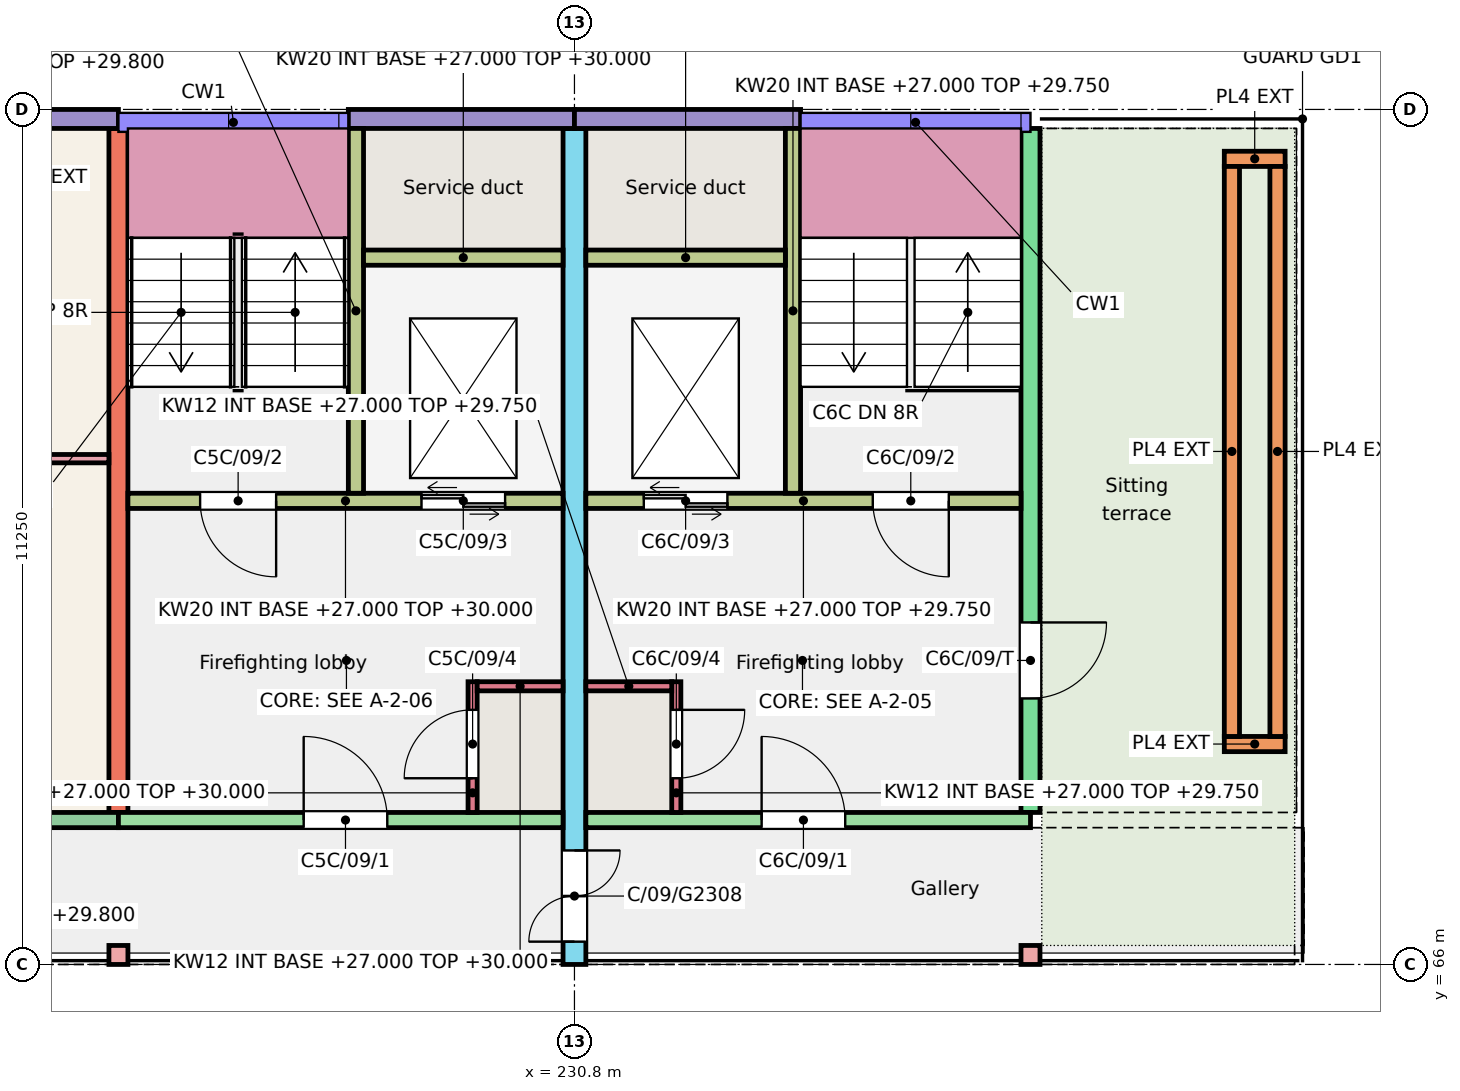
"""IFC4 building model, lengths in metres.
Left out: names, types, materials, properties, quantities, classifications, styles, units other than length and angle.
Written with IfcOpenShell. Run it as: python <this file> out.ifc"""

import sys

from ifc_helpers import new_model, si_unit, direction, frame, frame_2d, origin, origin_2d, place, context, subcontext, project, spatial, rectangle, extrude, element, fill, save


model = new_model("IFC4")
c1 = context("Model", 3, precision=1e-05, world=origin(), true_north=direction((0.0, 1.0)))
c2 = subcontext(c1, "Body", "Model", "MODEL_VIEW")
j1 = project(units=[si_unit("LENGTHUNIT", "METRE"), si_unit("PLANEANGLEUNIT", "RADIAN")], contexts=[c1])
p1 = place(None, origin())
s1 = spatial("IfcSite", under=j1, at=p1, CompositionType="ELEMENT")
p2 = place(p1, origin())
s2 = spatial("IfcBuilding", under=s1, at=p2, CompositionType="ELEMENT")
p3 = place(p2, frame((0.0, 0.0, 27.0)))
s3 = spatial("IfcBuildingStorey", under=s2, at=p3, CompositionType="ELEMENT", Elevation=27.0)
p4 = place(p3, frame((224.8, 68.0, 0.0), z_axis=(0.0, 0.0, 1.0), x_axis=(0.0, 1.0, 0.0)))
e1 = element("IfcWall", 1, at=p4, inside=s3, PredefinedType="SHEAR", context=c2, shape_type="SweptSolid", body=[
    extrude(rectangle(XDim=9.0, YDim=0.25, at=frame_2d((4.5, 0.0))), origin(), (0.0, 0.0, 1.0), 3.0),
])
p5 = place(p3, frame((230.8, 66.0, 0.0), z_axis=(0.0, 0.0, 1.0), x_axis=(0.0, 1.0, 0.0)))
e2 = element("IfcWall", 2, at=p5, inside=s3, PredefinedType="SHEAR", context=c2, shape_type="SweptSolid", body=[
    extrude(rectangle(XDim=11.0, YDim=0.3, at=frame_2d((5.5, 0.0))), origin(), (0.0, 0.0, 1.0), 3.0),
])
p6 = place(p5, frame((0.3, 0.0, 0.0)))
e3 = element("IfcOpeningElement", 3, at=p6, cuts=e2, PredefinedType="OPENING", context=c2, shape_type="SweptSolid", body=[
    extrude(rectangle(XDim=1.2, YDim=2.1, at=frame_2d((0.6, 1.05))), frame((0.0, 0.16, 0.0), z_axis=(0.0, -1.0, 0.0), x_axis=(1.0, 0.0, 0.0)), (0.0, 0.0, 1.0), 0.32),
])
p7 = place(p3, frame((236.8, 68.0, 0.0), z_axis=(0.0, 0.0, 1.0), x_axis=(0.0, 1.0, 0.0)))
e4 = element("IfcWall", 4, at=p7, inside=s3, PredefinedType="SHEAR", context=c2, shape_type="SweptSolid", body=[
    extrude(rectangle(XDim=9.0, YDim=0.25, at=frame_2d((4.5, 0.0))), origin(), (0.0, 0.0, 1.0), 3.0),
])
p8 = place(p7, frame((1.5, 0.0, 0.0)))
e5 = element("IfcOpeningElement", 5, at=p8, cuts=e4, PredefinedType="OPENING", context=c2, shape_type="SweptSolid", body=[
    extrude(rectangle(XDim=1.0, YDim=2.1, at=frame_2d((0.5, 1.05))), frame((0.0, 0.135, 0.0), z_axis=(0.0, -1.0, 0.0), x_axis=(1.0, 0.0, 0.0)), (0.0, 0.0, 1.0), 0.27),
])
p9 = place(p3, frame((221.2, 77.125, 0.0), z_axis=(0.0, 0.0, 1.0), x_axis=(1.0, 0.0, 0.0)))
e6 = element("IfcWall", 6, at=p9, inside=s3, PredefinedType="SOLIDWALL", context=c2, shape_type="SweptSolid", body=[
    extrude(rectangle(XDim=3.6, YDim=0.25, at=frame_2d((1.8, 0.0))), origin(), (0.0, 0.0, 1.0), 3.0),
])
p10 = place(p9, frame((1.038, 0.0, 0.9)))
e7 = element("IfcOpeningElement", 7, at=p10, cuts=e6, PredefinedType="OPENING", context=c2, shape_type="SweptSolid", body=[
    extrude(rectangle(XDim=1.5, YDim=1.5, at=frame_2d((0.75, 0.75))), frame((0.0, 0.135, 0.0), z_axis=(0.0, -1.0, 0.0), x_axis=(1.0, 0.0, 0.0)), (0.0, 0.0, 1.0), 0.27),
])
p11 = place(p3, frame((221.2, 67.9, 0.0), z_axis=(0.0, 0.0, 1.0), x_axis=(1.0, 0.0, 0.0)))
e8 = element("IfcWall", 8, at=p11, inside=s3, PredefinedType="SOLIDWALL", context=c2, shape_type="SweptSolid", body=[
    extrude(rectangle(XDim=3.6, YDim=0.2, at=frame_2d((1.8, 0.0))), origin(), (0.0, 0.0, 1.0), 3.0),
])
p12 = place(p11, frame((1.038, 0.0, 0.9)))
e9 = element("IfcOpeningElement", 9, at=p12, cuts=e8, PredefinedType="OPENING", context=c2, shape_type="SweptSolid", body=[
    extrude(rectangle(XDim=1.5, YDim=1.5, at=frame_2d((0.75, 0.75))), frame((0.0, 0.11, 0.0), z_axis=(0.0, -1.0, 0.0), x_axis=(1.0, 0.0, 0.0)), (0.0, 0.0, 1.0), 0.22),
])
p13 = place(p3, frame((227.825, 77.125, 0.0), z_axis=(0.0, 0.0, 1.0), x_axis=(1.0, 0.0, 0.0)))
e10 = element("IfcWall", 10, at=p13, inside=s3, PredefinedType="SOLIDWALL", context=c2, shape_type="SweptSolid", body=[
    extrude(rectangle(XDim=2.975, YDim=0.25, at=frame_2d((1.488, 0.0))), origin(), (0.0, 0.0, 1.0), 3.0),
])
p14 = place(p3, frame((224.8, 67.9, 0.0), z_axis=(0.0, 0.0, 1.0), x_axis=(1.0, 0.0, 0.0)))
e11 = element("IfcWall", 11, at=p14, inside=s3, PredefinedType="SHEAR", context=c2, shape_type="SweptSolid", body=[
    extrude(rectangle(XDim=5.85, YDim=0.2, at=frame_2d((2.925, 0.0))), origin(), (0.0, 0.0, 1.0), 3.0),
])
p15 = place(p14, frame((2.438, 0.0, 0.0)))
e12 = element("IfcOpeningElement", 12, at=p15, cuts=e11, PredefinedType="OPENING", context=c2, shape_type="SweptSolid", body=[
    extrude(rectangle(XDim=1.1, YDim=2.1, at=frame_2d((0.55, 1.05))), frame((0.0, 0.11, 0.0), z_axis=(0.0, -1.0, 0.0), x_axis=(1.0, 0.0, 0.0)), (0.0, 0.0, 1.0), 0.22),
])
p16 = place(p3, frame((224.925, 72.1, 0.0), z_axis=(0.0, 0.0, 1.0), x_axis=(1.0, 0.0, 0.0)))
e13 = element("IfcWall", 13, at=p16, inside=s3, PredefinedType="SHEAR", context=c2, shape_type="SweptSolid", body=[
    extrude(rectangle(XDim=5.725, YDim=0.2, at=frame_2d((2.862, 0.0))), origin(), (0.0, 0.0, 1.0), 3.0),
])
p17 = place(p16, frame((0.95, 0.0, 0.0)))
e14 = element("IfcOpeningElement", 14, at=p17, cuts=e13, PredefinedType="OPENING", context=c2, shape_type="SweptSolid", body=[
    extrude(rectangle(XDim=1.0, YDim=2.1, at=frame_2d((0.5, 1.05))), frame((0.0, 0.11, 0.0), z_axis=(0.0, -1.0, 0.0), x_axis=(1.0, 0.0, 0.0)), (0.0, 0.0, 1.0), 0.22),
])
p18 = place(p16, frame((3.863, 0.0, 0.0)))
e15 = element("IfcOpeningElement", 15, at=p18, cuts=e13, PredefinedType="OPENING", context=c2, shape_type="SweptSolid", body=[
    extrude(rectangle(XDim=1.1, YDim=2.1, at=frame_2d((0.55, 1.05))), frame((0.0, 0.11, 0.0), z_axis=(0.0, -1.0, 0.0), x_axis=(1.0, 0.0, 0.0)), (0.0, 0.0, 1.0), 0.22),
])
p19 = place(p3, frame((227.925, 72.2, 0.0), z_axis=(0.0, 0.0, 1.0), x_axis=(0.0, 1.0, 0.0)))
e16 = element("IfcWall", 16, at=p19, inside=s3, PredefinedType="SHEAR", context=c2, shape_type="SweptSolid", body=[
    extrude(rectangle(XDim=4.8, YDim=0.2, at=frame_2d((2.4, 0.0))), origin(), (0.0, 0.0, 1.0), 3.0),
])
p20 = place(p3, frame((228.025, 75.3, 0.0), z_axis=(0.0, 0.0, 1.0), x_axis=(1.0, 0.0, 0.0)))
e17 = element("IfcWall", 17, at=p20, inside=s3, PredefinedType="SHEAR", context=c2, shape_type="SweptSolid", body=[
    extrude(rectangle(XDim=2.625, YDim=0.2, at=frame_2d((1.312, 0.0))), origin(), (0.0, 0.0, 1.0), 3.0),
])
p21 = place(p3, frame((229.46, 68.0, 0.0), z_axis=(0.0, 0.0, 1.0), x_axis=(0.0, 1.0, 0.0)))
e18 = element("IfcWall", 18, at=p21, inside=s3, PredefinedType="SHEAR", context=c2, shape_type="SweptSolid", body=[
    extrude(rectangle(XDim=1.72, YDim=0.12, at=frame_2d((0.86, 0.0))), origin(), (0.0, 0.0, 1.0), 3.0),
])
p22 = place(p21, frame((0.45, 0.0, 0.0)))
e19 = element("IfcOpeningElement", 19, at=p22, cuts=e18, PredefinedType="OPENING", context=c2, shape_type="SweptSolid", body=[
    extrude(rectangle(XDim=0.9, YDim=2.1, at=frame_2d((0.45, 1.05))), frame((0.0, 0.07, 0.0), z_axis=(0.0, -1.0, 0.0), x_axis=(1.0, 0.0, 0.0)), (0.0, 0.0, 1.0), 0.14),
])
p23 = place(p3, frame((229.52, 69.66, 0.0), z_axis=(0.0, 0.0, 1.0), x_axis=(1.0, 0.0, 0.0)))
e20 = element("IfcWall", 20, at=p23, inside=s3, PredefinedType="SHEAR", context=c2, shape_type="SweptSolid", body=[
    extrude(rectangle(XDim=1.13, YDim=0.12, at=frame_2d((0.565, 0.0))), origin(), (0.0, 0.0, 1.0), 3.0),
])
p24 = place(p3, frame((230.8, 77.125, 0.0), z_axis=(0.0, 0.0, 1.0), x_axis=(1.0, 0.0, 0.0)))
e21 = element("IfcWall", 21, at=p24, inside=s3, PredefinedType="SOLIDWALL", context=c2, shape_type="SweptSolid", body=[
    extrude(rectangle(XDim=2.975, YDim=0.25, at=frame_2d((1.487, 0.0))), origin(), (0.0, 0.0, 1.0), 3.0),
])
p25 = place(p3, frame((230.95, 67.9, 0.0), z_axis=(0.0, 0.0, 1.0), x_axis=(1.0, 0.0, 0.0)))
e22 = element("IfcWall", 22, at=p25, inside=s3, PredefinedType="SHEAR", context=c2, shape_type="SweptSolid", body=[
    extrude(rectangle(XDim=5.85, YDim=0.2, at=frame_2d((2.925, 0.0))), origin(), (0.0, 0.0, 1.0), 2.75),
])
p26 = place(p25, frame((2.312, 0.0, 0.0)))
e23 = element("IfcOpeningElement", 23, at=p26, cuts=e22, PredefinedType="OPENING", context=c2, shape_type="SweptSolid", body=[
    extrude(rectangle(XDim=1.1, YDim=2.1, at=frame_2d((0.55, 1.05))), frame((0.0, 0.11, 0.0), z_axis=(0.0, -1.0, 0.0), x_axis=(1.0, 0.0, 0.0)), (0.0, 0.0, 1.0), 0.22),
])
p27 = place(p3, frame((230.95, 72.1, 0.0), z_axis=(0.0, 0.0, 1.0), x_axis=(1.0, 0.0, 0.0)))
e24 = element("IfcWall", 24, at=p27, inside=s3, PredefinedType="SHEAR", context=c2, shape_type="SweptSolid", body=[
    extrude(rectangle(XDim=5.725, YDim=0.2, at=frame_2d((2.863, 0.0))), origin(), (0.0, 0.0, 1.0), 2.75),
])
p28 = place(p27, frame((3.775, 0.0, 0.0)))
e25 = element("IfcOpeningElement", 25, at=p28, cuts=e24, PredefinedType="OPENING", context=c2, shape_type="SweptSolid", body=[
    extrude(rectangle(XDim=1.0, YDim=2.1, at=frame_2d((0.5, 1.05))), frame((0.0, 0.11, 0.0), z_axis=(0.0, -1.0, 0.0), x_axis=(1.0, 0.0, 0.0)), (0.0, 0.0, 1.0), 0.22),
])
p29 = place(p27, frame((0.762, 0.0, 0.0)))
e26 = element("IfcOpeningElement", 26, at=p29, cuts=e24, PredefinedType="OPENING", context=c2, shape_type="SweptSolid", body=[
    extrude(rectangle(XDim=1.1, YDim=2.1, at=frame_2d((0.55, 1.05))), frame((0.0, 0.11, 0.0), z_axis=(0.0, -1.0, 0.0), x_axis=(1.0, 0.0, 0.0)), (0.0, 0.0, 1.0), 0.22),
])
p30 = place(p3, frame((233.675, 72.2, 0.0), z_axis=(0.0, 0.0, 1.0), x_axis=(0.0, 1.0, 0.0)))
e27 = element("IfcWall", 27, at=p30, inside=s3, PredefinedType="SHEAR", context=c2, shape_type="SweptSolid", body=[
    extrude(rectangle(XDim=4.8, YDim=0.2, at=frame_2d((2.4, 0.0))), origin(), (0.0, 0.0, 1.0), 2.75),
])
p31 = place(p3, frame((230.95, 75.3, 0.0), z_axis=(0.0, 0.0, 1.0), x_axis=(1.0, 0.0, 0.0)))
e28 = element("IfcWall", 28, at=p31, inside=s3, PredefinedType="SHEAR", context=c2, shape_type="SweptSolid", body=[
    extrude(rectangle(XDim=2.625, YDim=0.2, at=frame_2d((1.312, 0.0))), origin(), (0.0, 0.0, 1.0), 2.75),
])
p32 = place(p3, frame((232.14, 68.0, 0.0), z_axis=(0.0, 0.0, 1.0), x_axis=(0.0, 1.0, 0.0)))
e29 = element("IfcWall", 29, at=p32, inside=s3, PredefinedType="SHEAR", context=c2, shape_type="SweptSolid", body=[
    extrude(rectangle(XDim=1.72, YDim=0.12, at=frame_2d((0.86, 0.0))), origin(), (0.0, 0.0, 1.0), 2.75),
])
p33 = place(p32, frame((0.45, 0.0, 0.0)))
e30 = element("IfcOpeningElement", 30, at=p33, cuts=e29, PredefinedType="OPENING", context=c2, shape_type="SweptSolid", body=[
    extrude(rectangle(XDim=0.9, YDim=2.1, at=frame_2d((0.45, 1.05))), frame((0.0, 0.07, 0.0), z_axis=(0.0, -1.0, 0.0), x_axis=(1.0, 0.0, 0.0)), (0.0, 0.0, 1.0), 0.14),
])
p34 = place(p3, frame((230.95, 69.66, 0.0), z_axis=(0.0, 0.0, 1.0), x_axis=(1.0, 0.0, 0.0)))
e31 = element("IfcWall", 31, at=p34, inside=s3, PredefinedType="SHEAR", context=c2, shape_type="SweptSolid", body=[
    extrude(rectangle(XDim=1.13, YDim=0.12, at=frame_2d((0.565, 0.0))), origin(), (0.0, 0.0, 1.0), 2.75),
])
for number, where, z_axis, x_axis in (
    (32, (224.8, 66.125, 0.0), (0.0, 0.0, 1.0), (1.0, 0.0, 0.0)),
    (33, (236.8, 66.125, 0.0), (0.0, 0.0, 1.0), (1.0, 0.0, 0.0)),
):
    element("IfcColumn", number, at=place(p3, frame(where, z_axis=z_axis, x_axis=x_axis)), inside=s3, PredefinedType="COLUMN", context=c2, shape_type="SweptSolid", body=[
        extrude(rectangle(XDim=0.25, YDim=0.25, at=origin_2d()), origin(), (0.0, 0.0, 1.0), 3.0),
    ])
for number, where, z_axis, x_axis in (
    (34, (239.35, 68.9, 0.01), (0.0, 0.0, 1.0), (1.0, 0.0, 0.0)),
    (35, (239.35, 76.6, 0.01), (0.0, 0.0, 1.0), (1.0, 0.0, 0.0)),
):
    element("IfcWall", number, at=place(p3, frame(where, z_axis=z_axis, x_axis=x_axis)), inside=s3, PredefinedType="SOLIDWALL", context=c2, shape_type="SweptSolid", body=[
        extrude(rectangle(XDim=0.8, YDim=0.2, at=frame_2d((0.4, 0.0))), origin(), (0.0, 0.0, 1.0), 0.45),
    ])
for number, where, z_axis, x_axis in (
    (36, (239.45, 69.0, 0.01), (0.0, 0.0, 1.0), (0.0, 1.0, 0.0)),
    (37, (240.05, 69.0, 0.01), (0.0, 0.0, 1.0), (0.0, 1.0, 0.0)),
):
    element("IfcWall", number, at=place(p3, frame(where, z_axis=z_axis, x_axis=x_axis)), inside=s3, PredefinedType="SOLIDWALL", context=c2, shape_type="SweptSolid", body=[
        extrude(rectangle(XDim=7.5, YDim=0.2, at=frame_2d((3.75, 0.0))), origin(), (0.0, 0.0, 1.0), 0.45),
    ])
p35 = place(p3, frame((221.3, 72.655, 0.0), z_axis=(0.0, 0.0, 1.0), x_axis=(1.0, 0.0, 0.0)))
e38 = element("IfcWall", 38, at=p35, inside=s3, PredefinedType="PARTITIONING", context=c2, shape_type="SweptSolid", body=[
    extrude(rectangle(XDim=3.375, YDim=0.11, at=frame_2d((1.688, 0.0))), origin(), (0.0, 0.0, 1.0), 2.8),
])
p36 = place(p15, origin())
e39 = element("IfcDoor", 39, at=p36, inside=s3, OperationType="SINGLE_SWING_LEFT", PredefinedType="DOOR", context=c2, shape_type="SweptSolid", body=[
    extrude(rectangle(XDim=1.1, YDim=2.1, at=frame_2d((0.55, 1.05))), frame((0.0, 0.025, 0.0), z_axis=(0.0, -1.0, 0.0), x_axis=(1.0, 0.0, 0.0)), (0.0, 0.0, 1.0), 0.05),
])
fill(e12, e39)
p37 = place(p17, origin())
e40 = element("IfcDoor", 40, at=p37, inside=s3, OperationType="SINGLE_SWING_RIGHT", PredefinedType="DOOR", context=c2, shape_type="SweptSolid", body=[
    extrude(rectangle(XDim=1.0, YDim=2.1, at=frame_2d((0.5, 1.05))), frame((0.0, 0.025, 0.0), z_axis=(0.0, -1.0, 0.0), x_axis=(1.0, 0.0, 0.0)), (0.0, 0.0, 1.0), 0.05),
])
fill(e14, e40)
p38 = place(p18, origin())
e41 = element("IfcDoor", 41, at=p38, inside=s3, OperationType="DOUBLE_DOOR_SLIDING", PredefinedType="DOOR", context=c2, shape_type="SweptSolid", body=[
    extrude(rectangle(XDim=1.1, YDim=2.1, at=frame_2d((0.55, 1.05))), frame((0.0, 0.025, 0.0), z_axis=(0.0, -1.0, 0.0), x_axis=(1.0, 0.0, 0.0)), (0.0, 0.0, 1.0), 0.05),
])
fill(e15, e41)
p39 = place(p22, origin())
e42 = element("IfcDoor", 42, at=p39, inside=s3, OperationType="SINGLE_SWING_LEFT", PredefinedType="DOOR", context=c2, shape_type="SweptSolid", body=[
    extrude(rectangle(XDim=0.9, YDim=2.1, at=frame_2d((0.45, 1.05))), frame((0.0, 0.025, 0.0), z_axis=(0.0, -1.0, 0.0), x_axis=(1.0, 0.0, 0.0)), (0.0, 0.0, 1.0), 0.05),
])
fill(e19, e42)
p40 = place(p26, origin())
e43 = element("IfcDoor", 43, at=p40, inside=s3, OperationType="SINGLE_SWING_LEFT", PredefinedType="DOOR", context=c2, shape_type="SweptSolid", body=[
    extrude(rectangle(XDim=1.1, YDim=2.1, at=frame_2d((0.55, 1.05))), frame((0.0, 0.025, 0.0), z_axis=(0.0, -1.0, 0.0), x_axis=(1.0, 0.0, 0.0)), (0.0, 0.0, 1.0), 0.05),
])
fill(e23, e43)
p41 = place(p28, origin())
e44 = element("IfcDoor", 44, at=p41, inside=s3, OperationType="SINGLE_SWING_RIGHT", PredefinedType="DOOR", context=c2, shape_type="SweptSolid", body=[
    extrude(rectangle(XDim=1.0, YDim=2.1, at=frame_2d((0.5, 1.05))), frame((0.0, 0.025, 0.0), z_axis=(0.0, -1.0, 0.0), x_axis=(1.0, 0.0, 0.0)), (0.0, 0.0, 1.0), 0.05),
])
fill(e25, e44)
p42 = place(p29, origin())
e45 = element("IfcDoor", 45, at=p42, inside=s3, OperationType="DOUBLE_DOOR_SLIDING", PredefinedType="DOOR", context=c2, shape_type="SweptSolid", body=[
    extrude(rectangle(XDim=1.1, YDim=2.1, at=frame_2d((0.55, 1.05))), frame((0.0, 0.025, 0.0), z_axis=(0.0, -1.0, 0.0), x_axis=(1.0, 0.0, 0.0)), (0.0, 0.0, 1.0), 0.05),
])
fill(e26, e45)
p43 = place(p33, origin())
e46 = element("IfcDoor", 46, at=p43, inside=s3, OperationType="SINGLE_SWING_RIGHT", PredefinedType="DOOR", context=c2, shape_type="SweptSolid", body=[
    extrude(rectangle(XDim=0.9, YDim=2.1, at=frame_2d((0.45, 1.05))), frame((0.0, 0.025, 0.0), z_axis=(0.0, -1.0, 0.0), x_axis=(1.0, 0.0, 0.0)), (0.0, 0.0, 1.0), 0.05),
])
fill(e30, e46)
p44 = place(p8, origin())
e47 = element("IfcDoor", 47, at=p44, inside=s3, OperationType="SINGLE_SWING_RIGHT", PredefinedType="DOOR", context=c2, shape_type="SweptSolid", body=[
    extrude(rectangle(XDim=1.0, YDim=2.1, at=frame_2d((0.5, 1.05))), frame((0.0, 0.025, 0.0), z_axis=(0.0, -1.0, 0.0), x_axis=(1.0, 0.0, 0.0)), (0.0, 0.0, 1.0), 0.05),
])
fill(e5, e47)
p45 = place(p6, origin())
e48 = element("IfcDoor", 48, at=p45, inside=s3, OperationType="DOUBLE_DOOR_SINGLE_SWING", PredefinedType="DOOR", context=c2, shape_type="SweptSolid", body=[
    extrude(rectangle(XDim=1.2, YDim=2.1, at=frame_2d((0.6, 1.05))), frame((0.0, 0.025, 0.0), z_axis=(0.0, -1.0, 0.0), x_axis=(1.0, 0.0, 0.0)), (0.0, 0.0, 1.0), 0.05),
])
fill(e3, e48)
save(model, sys.argv[1])
